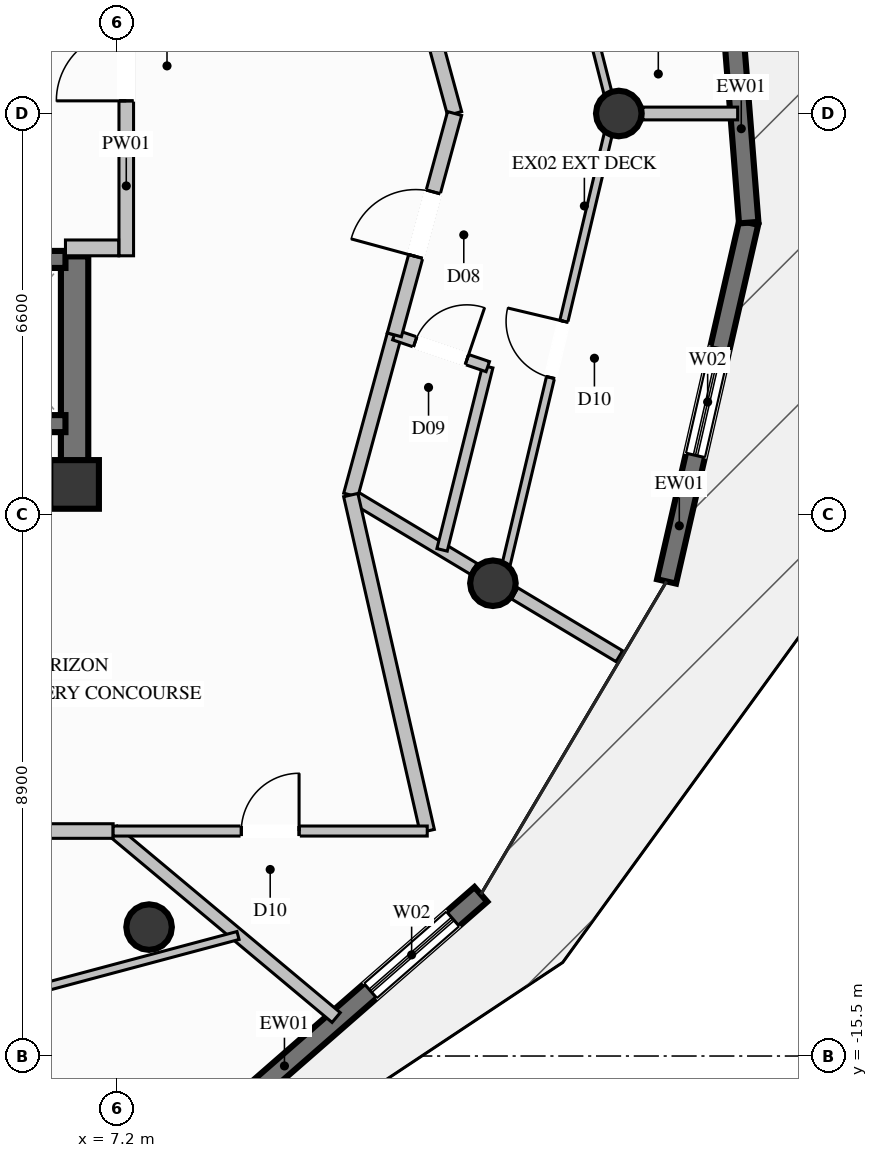
"""IFC4 building model, lengths in metres.
Left out: names, types, materials, properties, quantities, classifications, styles, units other than length and angle.
Written with IfcOpenShell. Run it as: python <this file> out.ifc"""

import sys

from ifc_helpers import new_model, si_unit, direction, frame, frame_2d, origin, origin_2d, place, context, subcontext, project, spatial, rectangle, circle, extrude, element, fill, save


model = new_model("IFC4")
c1 = context("Model", 3, precision=1e-05, world=origin(), true_north=direction((0.0, 1.0)))
c2 = subcontext(c1, "Body", "Model", "MODEL_VIEW")
j1 = project(units=[si_unit("LENGTHUNIT", "METRE"), si_unit("PLANEANGLEUNIT", "RADIAN")], contexts=[c1])
p1 = place(None, origin())
s1 = spatial("IfcSite", under=j1, at=p1, CompositionType="ELEMENT")
p2 = place(p1, origin())
s2 = spatial("IfcBuilding", under=s1, at=p2, CompositionType="ELEMENT")
p3 = place(p2, frame((0.0, 0.0, 239.2)))
s3 = spatial("IfcBuildingStorey", under=s2, at=p3, CompositionType="ELEMENT", Elevation=239.2)
p4 = place(p3, frame((6.5, -6.1, 0.0), z_axis=(0.0, 0.0, 1.0), x_axis=(1.0, 0.0, 0.0)))
e1 = element("IfcColumn", 1, at=p4, inside=s3, PredefinedType="COLUMN", context=c2, shape_type="SweptSolid", body=[
    extrude(rectangle(XDim=0.8, YDim=0.8, at=origin_2d()), origin(), (0.0, 0.0, 1.0), 3.8),
])
p5 = place(p3, frame((4.15, -6.1, 0.0), z_axis=(0.0, 0.0, 1.0), x_axis=(1.0, 0.0, 0.0)))
e2 = element("IfcWall", 2, at=p5, inside=s3, PredefinedType="SHEAR", context=c2, shape_type="SweptSolid", body=[
    extrude(rectangle(XDim=2.125, YDim=0.45, at=frame_2d((1.062, 0.0))), origin(), (0.0, 0.0, 1.0), 3.8),
])
p6 = place(p3, frame((6.5, -6.325, 0.0), z_axis=(0.0, 0.0, 1.0), x_axis=(0.0, 1.0, 0.0)))
e3 = element("IfcWall", 3, at=p6, inside=s3, PredefinedType="SHEAR", context=c2, shape_type="SweptSolid", body=[
    extrude(rectangle(XDim=3.975, YDim=0.45, at=frame_2d((1.987, 0.0))), origin(), (0.0, 0.0, 1.0), 3.8),
])
for number, where, z_axis, x_axis in (
    (4, (15.45, 0.0, 0.0), (0.0, 0.0, 1.0), (1.0, 0.0, 0.0)),
    (5, (7.725, -13.38, 0.0), (0.0, 0.0, 1.0), (1.0, 0.0, 0.0)),
    (6, (13.38, -7.725, 0.0), (0.0, 0.0, 1.0), (1.0, 0.0, 0.0)),
):
    element("IfcColumn", number, at=place(p3, frame(where, z_axis=z_axis, x_axis=x_axis)), inside=s3, PredefinedType="COLUMN", context=c2, shape_type="SweptSolid", body=[
        extrude(circle(Radius=0.375, at=origin_2d()), origin(), (0.0, 0.0, 1.0), 3.8),
    ])
p7 = place(p3, frame((13.182, -12.842, 0.0), z_axis=(0.0, 0.0, 1.0), x_axis=(-0.753243589512, -0.657741662706, 0.0)))
e7 = element("IfcWall", 7, at=p7, inside=s3, PredefinedType="SOLIDWALL", context=c2, shape_type="SweptSolid", body=[
    extrude(rectangle(XDim=5.916, YDim=0.32, at=frame_2d((2.958, 0.0))), origin(), (0.0, 0.0, 1.0), 3.57),
])
p8 = place(p7, frame((0.612, 0.0, 0.35)))
e8 = element("IfcOpeningElement", 8, at=p8, cuts=e7, PredefinedType="OPENING", context=c2, shape_type="SweptSolid", body=[
    extrude(rectangle(XDim=1.8, YDim=2.6, at=frame_2d((0.9, 1.3))), frame((0.0, 0.17, 0.0), z_axis=(0.0, -1.0, 0.0), x_axis=(1.0, 0.0, 0.0)), (0.0, 0.0, 1.0), 0.34),
])
p9 = place(p3, frame((17.587, -1.795, 0.0), z_axis=(0.0, 0.0, 1.0), x_axis=(-0.223174159959, -0.974778587335, 0.0)))
e9 = element("IfcWall", 9, at=p9, inside=s3, PredefinedType="SOLIDWALL", context=c2, shape_type="SweptSolid", body=[
    extrude(rectangle(XDim=6.053, YDim=0.32, at=frame_2d((3.026, 0.0))), origin(), (0.0, 0.0, 1.0), 3.57),
])
p10 = place(p9, frame((2.126, 0.0, 0.35)))
e10 = element("IfcOpeningElement", 10, at=p10, cuts=e9, PredefinedType="OPENING", context=c2, shape_type="SweptSolid", body=[
    extrude(rectangle(XDim=1.8, YDim=2.6, at=frame_2d((0.9, 1.3))), frame((0.0, 0.17, 0.0), z_axis=(0.0, -1.0, 0.0), x_axis=(1.0, 0.0, 0.0)), (0.0, 0.0, 1.0), 0.34),
])
p11 = place(p3, frame((17.105, 4.282, 0.0), z_axis=(0.0, 0.0, 1.0), x_axis=(0.079057550351, -0.996870053584, 0.0)))
e11 = element("IfcWall", 11, at=p11, inside=s3, PredefinedType="SOLIDWALL", context=c2, shape_type="SweptSolid", body=[
    extrude(rectangle(XDim=6.096, YDim=0.32, at=frame_2d((3.048, 0.0))), origin(), (0.0, 0.0, 1.0), 3.57),
])
p12 = place(p11, frame((1.646, 0.0, 0.0)))
e12 = element("IfcOpeningElement", 12, at=p12, cuts=e11, PredefinedType="OPENING", context=c2, shape_type="SweptSolid", body=[
    extrude(rectangle(XDim=1.1, YDim=2.2, at=frame_2d((0.55, 1.1))), frame((0.0, 0.17, 0.0), z_axis=(0.0, -1.0, 0.0), x_axis=(1.0, 0.0, 0.0)), (0.0, 0.0, 1.0), 0.34),
])
p13 = place(p3, frame((4.15, -5.1, 0.0), z_axis=(0.0, 0.0, 1.0), x_axis=(1.0, 0.0, 0.0)))
e13 = element("IfcWall", 13, at=p13, inside=s3, PredefinedType="SOLIDWALL", context=c2, shape_type="SweptSolid", body=[
    extrude(rectangle(XDim=2.2, YDim=0.28, at=frame_2d((1.1, 0.0))), origin(), (0.0, 0.0, 1.0), 3.57),
])
p14 = place(p3, frame((6.35, -2.4, 0.0), z_axis=(0.0, 0.0, 1.0), x_axis=(-1.0, 0.0, 0.0)))
e14 = element("IfcWall", 14, at=p14, inside=s3, PredefinedType="SOLIDWALL", context=c2, shape_type="SweptSolid", body=[
    extrude(rectangle(XDim=2.2, YDim=0.28, at=frame_2d((1.1, 0.0))), origin(), (0.0, 0.0, 1.0), 3.57),
])
p15 = place(p14, frame((0.5, 0.0, 0.0)))
e15 = element("IfcOpeningElement", 15, at=p15, cuts=e14, PredefinedType="OPENING", context=c2, shape_type="SweptSolid", body=[
    extrude(rectangle(XDim=1.2, YDim=2.2, at=frame_2d((0.6, 1.1))), frame((0.0, 0.15, 0.0), z_axis=(0.0, -1.0, 0.0), x_axis=(1.0, 0.0, 0.0)), (0.0, 0.0, 1.0), 0.3),
])
p16 = place(p3, frame((7.35, -2.34, 0.0), z_axis=(0.0, 0.0, 1.0), x_axis=(0.0, 1.0, 0.0)))
e16 = element("IfcWall", 16, at=p16, inside=s3, PredefinedType="PARTITIONING", context=c2, shape_type="SweptSolid", body=[
    extrude(rectangle(XDim=5.07, YDim=0.24, at=frame_2d((2.535, 0.0))), origin(), (0.0, 0.0, 1.0), 2.655),
])
p17 = place(p16, frame((2.548, 0.0, 0.0)))
e17 = element("IfcOpeningElement", 17, at=p17, cuts=e16, PredefinedType="OPENING", context=c2, shape_type="SweptSolid", body=[
    extrude(rectangle(XDim=1.15, YDim=2.2, at=frame_2d((0.575, 1.1))), frame((0.0, 0.13, 0.0), z_axis=(0.0, -1.0, 0.0), x_axis=(1.0, 0.0, 0.0)), (0.0, 0.0, 1.0), 0.26),
])
p18 = place(p3, frame((6.35, -2.21, 0.0), z_axis=(0.0, 0.0, 1.0), x_axis=(1.0, 0.0, 0.0)))
e18 = element("IfcWall", 18, at=p18, inside=s3, PredefinedType="PARTITIONING", context=c2, shape_type="SweptSolid", body=[
    extrude(rectangle(XDim=0.875, YDim=0.26, at=frame_2d((0.438, 0.0))), origin(), (0.0, 0.0, 1.0), 3.57),
])
p19 = place(p3, frame((11.042, -6.275, 0.0), z_axis=(0.0, 0.0, 1.0), x_axis=(0.857502061287, -0.514480529164, 0.0)))
e19 = element("IfcWall", 19, at=p19, inside=s3, PredefinedType="PARTITIONING", context=c2, shape_type="SweptSolid", body=[
    extrude(rectangle(XDim=2.358, YDim=0.21, at=frame_2d((1.179, 0.0))), origin(), (0.0, 0.0, 1.0), 3.011),
])
p20 = place(p3, frame((13.738, -7.892, 0.0), z_axis=(0.0, 0.0, 1.0), x_axis=(0.857407053578, -0.514638848587, 0.0)))
e20 = element("IfcWall", 20, at=p20, inside=s3, PredefinedType="PARTITIONING", context=c2, shape_type="SweptSolid", body=[
    extrude(rectangle(XDim=2.007, YDim=0.21, at=frame_2d((1.003, 0.0))), origin(), (0.0, 0.0, 1.0), 3.57),
])
p21 = place(p3, frame((11.042, -6.275, 0.0), z_axis=(0.0, 0.0, 1.0), x_axis=(0.262572701387, 0.964912211803, 0.0)))
e21 = element("IfcWall", 21, at=p21, inside=s3, PredefinedType="PARTITIONING", context=c2, shape_type="SweptSolid", body=[
    extrude(rectangle(XDim=2.731, YDim=0.24, at=frame_2d((1.365, 0.0))), origin(), (0.0, 0.0, 1.0), 3.57),
])
p22 = place(p3, frame((12.544, -7.176, 0.0), z_axis=(0.0, 0.0, 1.0), x_axis=(0.241851063072, 0.970313384062, 0.0)))
e22 = element("IfcWall", 22, at=p22, inside=s3, PredefinedType="PLUMBINGWALL", context=c2, shape_type="SweptSolid", body=[
    extrude(rectangle(XDim=3.105, YDim=0.175, at=frame_2d((1.553, 0.0))), origin(), (0.0, 0.0, 1.0), 3.57),
])
p23 = place(p3, frame((11.759, -3.64, 0.0), z_axis=(0.0, 0.0, 1.0), x_axis=(0.946586404748, -0.322450272671, 0.0)))
e23 = element("IfcWall", 23, at=p23, inside=s3, PredefinedType="PLUMBINGWALL", context=c2, shape_type="SweptSolid", body=[
    extrude(rectangle(XDim=1.623, YDim=0.175, at=frame_2d((0.811, 0.0))), origin(), (0.0, 0.0, 1.0), 3.57),
])
p24 = place(p23, frame((0.361, 0.0, 0.0)))
e24 = element("IfcOpeningElement", 24, at=p24, cuts=e23, PredefinedType="OPENING", context=c2, shape_type="SweptSolid", body=[
    extrude(rectangle(XDim=0.9, YDim=2.1, at=frame_2d((0.45, 1.05))), frame((0.0, 0.098, 0.0), z_axis=(0.0, -1.0, 0.0), x_axis=(1.0, 0.0, 0.0)), (0.0, 0.0, 1.0), 0.195),
])
p25 = place(p3, frame((15.845, 0.0, 0.0), z_axis=(0.0, 0.0, 1.0), x_axis=(1.0, 0.0, 0.0)))
e25 = element("IfcWall", 25, at=p25, inside=s3, PredefinedType="PARTITIONING", context=c2, shape_type="SweptSolid", body=[
    extrude(rectangle(XDim=1.56, YDim=0.21, at=frame_2d((0.78, 0.0))), origin(), (0.0, 0.0, 1.0), 3.57),
])
p26 = place(p3, frame((12.75, 0.0, 0.0), z_axis=(0.0, 0.0, 1.0), x_axis=(-0.262640884433, 0.964893655189, 0.0)))
e26 = element("IfcWall", 26, at=p26, inside=s3, PredefinedType="PARTITIONING", context=c2, shape_type="SweptSolid", body=[
    extrude(rectangle(XDim=6.503, YDim=0.24, at=frame_2d((3.251, 0.0))), origin(), (0.0, 0.0, 1.0), 3.57),
])
p27 = place(p3, frame((11.759, -3.64, 0.0), z_axis=(0.0, 0.0, 1.0), x_axis=(0.2626902414, 0.964880219029, 0.0)))
e27 = element("IfcWall", 27, at=p27, inside=s3, PredefinedType="PARTITIONING", context=c2, shape_type="SweptSolid", body=[
    extrude(rectangle(XDim=3.772, YDim=0.24, at=frame_2d((1.886, 0.0))), origin(), (0.0, 0.0, 1.0), 3.57),
])
p28 = place(p27, frame((1.336, 0.0, 0.0)))
e28 = element("IfcOpeningElement", 28, at=p28, cuts=e27, PredefinedType="OPENING", context=c2, shape_type="SweptSolid", body=[
    extrude(rectangle(XDim=1.1, YDim=2.3, at=frame_2d((0.55, 1.15))), frame((0.0, 0.13, 0.0), z_axis=(0.0, -1.0, 0.0), x_axis=(1.0, 0.0, 0.0)), (0.0, 0.0, 1.0), 0.26),
])
p29 = place(p3, frame((13.516, -7.759, 0.0), z_axis=(0.0, 0.0, 1.0), x_axis=(0.230840940032, 0.972991500685, 0.0)))
e29 = element("IfcWall", 29, at=p29, inside=s3, PredefinedType="PARTITIONING", context=c2, shape_type="SweptSolid", body=[
    extrude(rectangle(XDim=7.974, YDim=0.135, at=frame_2d((3.987, 0.0))), origin(), (0.0, 0.0, 1.0), 3.139),
])
p30 = place(p29, frame((3.512, 0.0, 0.0)))
e30 = element("IfcOpeningElement", 30, at=p30, cuts=e29, PredefinedType="OPENING", context=c2, shape_type="SweptSolid", body=[
    extrude(rectangle(XDim=0.95, YDim=2.1, at=frame_2d((0.475, 1.05))), frame((0.0, 0.078, 0.0), z_axis=(0.0, -1.0, 0.0), x_axis=(1.0, 0.0, 0.0)), (0.0, 0.0, 1.0), 0.155),
])
p31 = place(p3, frame((15.357, 0.0, 0.0), z_axis=(0.0, 0.0, 1.0), x_axis=(-0.246948201866, 0.969028681513, 0.0)))
e31 = element("IfcWall", 31, at=p31, inside=s3, PredefinedType="PARTITIONING", context=c2, shape_type="SweptSolid", body=[
    extrude(rectangle(XDim=7.937, YDim=0.135, at=frame_2d((3.968, 0.0))), origin(), (0.0, 0.0, 1.0), 3.139),
])
p32 = place(p31, frame((3.493, 0.0, 0.0)))
e32 = element("IfcOpeningElement", 32, at=p32, cuts=e31, PredefinedType="OPENING", context=c2, shape_type="SweptSolid", body=[
    extrude(rectangle(XDim=0.95, YDim=2.1, at=frame_2d((0.475, 1.05))), frame((0.0, 0.078, 0.0), z_axis=(0.0, -1.0, 0.0), x_axis=(1.0, 0.0, 0.0)), (0.0, 0.0, 1.0), 0.155),
])
p33 = place(p3, frame((7.134, -11.8, 0.0), z_axis=(0.0, 0.0, 1.0), x_axis=(0.767165499913, -0.641449215249, 0.0)))
e33 = element("IfcWall", 33, at=p33, inside=s3, PredefinedType="PARTITIONING", context=c2, shape_type="SweptSolid", body=[
    extrude(rectangle(XDim=4.781, YDim=0.21, at=frame_2d((2.391, 0.0))), origin(), (0.0, 0.0, 1.0), 3.57),
])
p34 = place(p3, frame((0.0, -11.8, 0.0), z_axis=(0.0, 0.0, 1.0), x_axis=(1.0, 0.0, 0.0)))
e34 = element("IfcWall", 34, at=p34, inside=s3, PredefinedType="PARTITIONING", context=c2, shape_type="SweptSolid", body=[
    extrude(rectangle(XDim=7.134, YDim=0.24, at=frame_2d((3.567, 0.0))), origin(), (0.0, 0.0, 1.0), 3.57),
])
p35 = place(p3, frame((0.225, -15.91, 0.0), z_axis=(0.0, 0.0, 1.0), x_axis=(0.966188184598, 0.25783791797, 0.0)))
e35 = element("IfcWall", 35, at=p35, inside=s3, PredefinedType="PARTITIONING", context=c2, shape_type="SweptSolid", body=[
    extrude(rectangle(XDim=9.277, YDim=0.135, at=frame_2d((4.638, 0.0))), origin(), (0.0, 0.0, 1.0), 3.139),
])
p36 = place(p35, frame((4.163, 0.0, 0.0)))
e36 = element("IfcOpeningElement", 36, at=p36, cuts=e35, PredefinedType="OPENING", context=c2, shape_type="SweptSolid", body=[
    extrude(rectangle(XDim=0.95, YDim=2.1, at=frame_2d((0.475, 1.05))), frame((0.0, 0.078, 0.0), z_axis=(0.0, -1.0, 0.0), x_axis=(1.0, 0.0, 0.0)), (0.0, 0.0, 1.0), 0.155),
])
p37 = place(p3, frame((12.3, -11.8, 0.0), z_axis=(0.0, 0.0, 1.0), x_axis=(-0.222014008723, 0.975043475918, 0.0)))
e37 = element("IfcWall", 37, at=p37, inside=s3, PredefinedType="PARTITIONING", context=c2, shape_type="SweptSolid", body=[
    extrude(rectangle(XDim=5.667, YDim=0.24, at=frame_2d((2.833, 0.0))), origin(), (0.0, 0.0, 1.0), 3.57),
])
p38 = place(p3, frame((7.134, -11.8, 0.0), z_axis=(0.0, 0.0, 1.0), x_axis=(1.0, 0.0, 0.0)))
e38 = element("IfcWall", 38, at=p38, inside=s3, PredefinedType="PARTITIONING", context=c2, shape_type="SweptSolid", body=[
    extrude(rectangle(XDim=5.166, YDim=0.165, at=frame_2d((2.583, 0.0))), origin(), (0.0, 0.0, 1.0), 3.57),
])
p39 = place(p38, frame((2.108, 0.0, 0.0)))
e39 = element("IfcOpeningElement", 39, at=p39, cuts=e38, PredefinedType="OPENING", context=c2, shape_type="SweptSolid", body=[
    extrude(rectangle(XDim=0.95, YDim=2.1, at=frame_2d((0.475, 1.05))), frame((0.0, 0.093, 0.0), z_axis=(0.0, -1.0, 0.0), x_axis=(1.0, 0.0, 0.0)), (0.0, 0.0, 1.0), 0.185),
])
p40 = place(p8, origin())
e40 = element("IfcWindow", 40, at=p40, inside=s3, PartitioningType="SINGLE_PANEL", PredefinedType="WINDOW", context=c2, shape_type="SweptSolid", body=[
    extrude(rectangle(XDim=1.8, YDim=2.6, at=frame_2d((0.9, 1.3))), frame((0.0, 0.03, 0.0), z_axis=(0.0, -1.0, 0.0), x_axis=(1.0, 0.0, 0.0)), (0.0, 0.0, 1.0), 0.06),
])
fill(e8, e40)
p41 = place(p10, origin())
e41 = element("IfcWindow", 41, at=p41, inside=s3, PartitioningType="SINGLE_PANEL", PredefinedType="WINDOW", context=c2, shape_type="SweptSolid", body=[
    extrude(rectangle(XDim=1.8, YDim=2.6, at=frame_2d((0.9, 1.3))), frame((0.0, 0.03, 0.0), z_axis=(0.0, -1.0, 0.0), x_axis=(1.0, 0.0, 0.0)), (0.0, 0.0, 1.0), 0.06),
])
fill(e10, e41)
p42 = place(p17, origin())
e42 = element("IfcDoor", 42, at=p42, inside=s3, OperationType="SINGLE_SWING_LEFT", PredefinedType="DOOR", context=c2, shape_type="SweptSolid", body=[
    extrude(rectangle(XDim=1.15, YDim=2.2, at=frame_2d((0.575, 1.1))), frame((0.0, 0.025, 0.0), z_axis=(0.0, -1.0, 0.0), x_axis=(1.0, 0.0, 0.0)), (0.0, 0.0, 1.0), 0.05),
])
fill(e17, e42)
p43 = place(p24, origin())
e43 = element("IfcDoor", 43, at=p43, inside=s3, OperationType="SINGLE_SWING_RIGHT", PredefinedType="DOOR", context=c2, shape_type="SweptSolid", body=[
    extrude(rectangle(XDim=0.9, YDim=2.1, at=frame_2d((0.45, 1.05))), frame((0.0, 0.025, 0.0), z_axis=(0.0, -1.0, 0.0), x_axis=(1.0, 0.0, 0.0)), (0.0, 0.0, 1.0), 0.05),
])
fill(e24, e43)
p44 = place(p28, origin())
e44 = element("IfcDoor", 44, at=p44, inside=s3, OperationType="SINGLE_SWING_LEFT", PredefinedType="DOOR", context=c2, shape_type="SweptSolid", body=[
    extrude(rectangle(XDim=1.1, YDim=2.3, at=frame_2d((0.55, 1.15))), frame((0.0, 0.025, 0.0), z_axis=(0.0, -1.0, 0.0), x_axis=(1.0, 0.0, 0.0)), (0.0, 0.0, 1.0), 0.05),
])
fill(e28, e44)
p45 = place(p30, origin())
e45 = element("IfcDoor", 45, at=p45, inside=s3, OperationType="SINGLE_SWING_RIGHT", PredefinedType="DOOR", context=c2, shape_type="SweptSolid", body=[
    extrude(rectangle(XDim=0.95, YDim=2.1, at=frame_2d((0.475, 1.05))), frame((0.0, 0.025, 0.0), z_axis=(0.0, -1.0, 0.0), x_axis=(1.0, 0.0, 0.0)), (0.0, 0.0, 1.0), 0.05),
])
fill(e30, e45)
p46 = place(p39, origin())
e46 = element("IfcDoor", 46, at=p46, inside=s3, OperationType="SINGLE_SWING_RIGHT", PredefinedType="DOOR", context=c2, shape_type="SweptSolid", body=[
    extrude(rectangle(XDim=0.95, YDim=2.1, at=frame_2d((0.475, 1.05))), frame((0.0, 0.025, 0.0), z_axis=(0.0, -1.0, 0.0), x_axis=(1.0, 0.0, 0.0)), (0.0, 0.0, 1.0), 0.05),
])
fill(e39, e46)
save(model, sys.argv[1])
